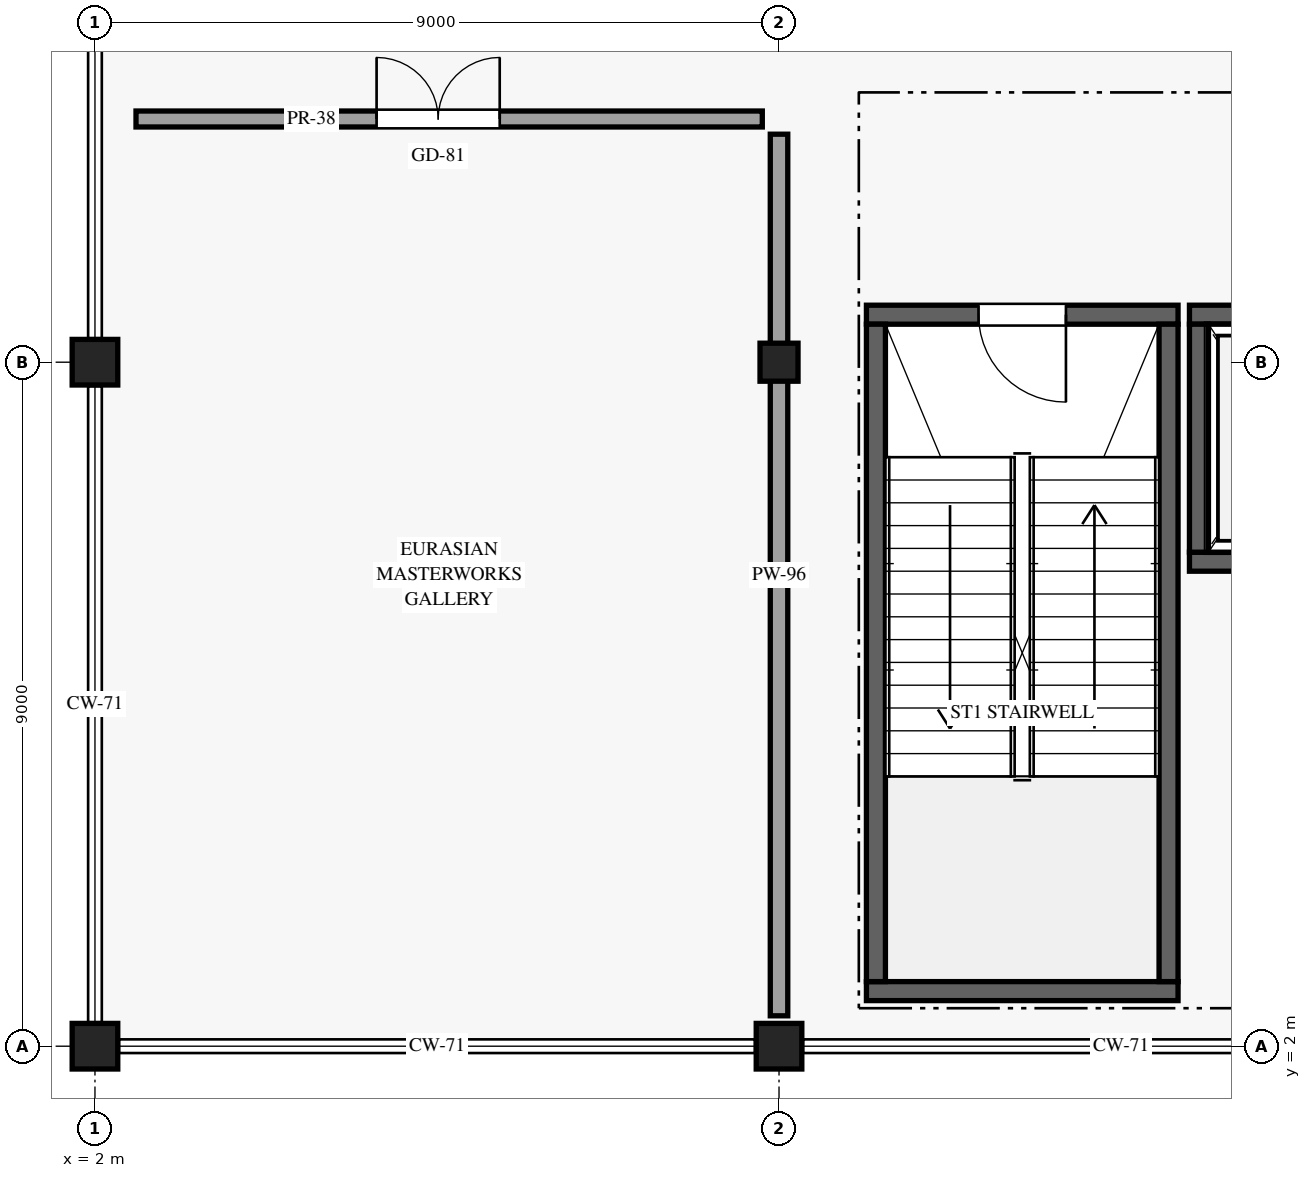
"""IFC4 building model, lengths in metres.
Left out: names, types, materials, properties, quantities, classifications, styles, units other than length and angle.
Written with IfcOpenShell. Run it as: python <this file> out.ifc"""

import sys

from ifc_helpers import new_model, si_unit, direction, frame, frame_2d, origin, origin_2d, place, context, subcontext, project, spatial, rectangle, extrude, element, fill, save


model = new_model("IFC4")
c1 = context("Model", 3, precision=1e-05, world=origin(), true_north=direction((0.0, 1.0)))
c2 = subcontext(c1, "Body", "Model", "MODEL_VIEW")
j1 = project(units=[si_unit("LENGTHUNIT", "METRE"), si_unit("PLANEANGLEUNIT", "RADIAN")], contexts=[c1])
p1 = place(None, origin())
s1 = spatial("IfcSite", under=j1, at=p1, CompositionType="ELEMENT")
p2 = place(p1, origin())
s2 = spatial("IfcBuilding", under=s1, at=p2, CompositionType="ELEMENT")
p3 = place(p2, frame((0.0, 0.0, 19.5)))
s3 = spatial("IfcBuildingStorey", under=s2, at=p3, CompositionType="ELEMENT", Elevation=19.5)
for number, where, z_axis, x_axis in (
    (1, (2.0, 2.0, 0.0), (0.0, 0.0, 1.0), (1.0, 0.0, 0.0)),
    (2, (2.0, 11.0, 0.0), (0.0, 0.0, 1.0), (1.0, 0.0, 0.0)),
    (3, (11.0, 2.0, 0.0), (0.0, 0.0, 1.0), (1.0, 0.0, 0.0)),
):
    element("IfcColumn", number, at=place(p3, frame(where, z_axis=z_axis, x_axis=x_axis)), inside=s3, PredefinedType="COLUMN", context=c2, shape_type="SweptSolid", body=[
        extrude(rectangle(XDim=0.6, YDim=0.6, at=origin_2d()), origin(), (0.0, 0.0, 1.0), 4.5),
    ])
p4 = place(p3, frame((11.0, 11.0, 0.0), z_axis=(0.0, 0.0, 1.0), x_axis=(1.0, 0.0, 0.0)))
e4 = element("IfcColumn", 4, at=p4, inside=s3, PredefinedType="COLUMN", context=c2, shape_type="SweptSolid", body=[
    extrude(rectangle(XDim=0.5, YDim=0.5, at=origin_2d()), origin(), (0.0, 0.0, 1.0), 4.5),
])
p5 = place(p3, frame((12.15, 11.625, 0.0), z_axis=(0.0, 0.0, 1.0), x_axis=(1.0, 0.0, 0.0)))
e5 = element("IfcWall", 5, at=p5, inside=s3, PredefinedType="SHEAR", context=c2, shape_type="SweptSolid", body=[
    extrude(rectangle(XDim=4.1, YDim=0.25, at=frame_2d((2.05, 0.0))), origin(), (0.0, 0.0, 1.0), 4.22),
])
p6 = place(p5, frame((2.625, 0.0, 0.0), z_axis=(0.0, 0.0, 1.0), x_axis=(-1.0, 0.0, 0.0)))
e6 = element("IfcOpeningElement", 6, at=p6, cuts=e5, PredefinedType="OPENING", context=c2, shape_type="SweptSolid", body=[
    extrude(rectangle(XDim=1.15, YDim=2.2, at=frame_2d((0.575, 1.1))), frame((0.0, 0.135, 0.0), z_axis=(0.0, -1.0, 0.0), x_axis=(1.0, 0.0, 0.0)), (0.0, 0.0, 1.0), 0.27),
])
p7 = place(p3, frame((12.15, 2.725, 0.0), z_axis=(0.0, 0.0, 1.0), x_axis=(1.0, 0.0, 0.0)))
e7 = element("IfcWall", 7, at=p7, inside=s3, PredefinedType="SHEAR", context=c2, shape_type="SweptSolid", body=[
    extrude(rectangle(XDim=4.1, YDim=0.25, at=frame_2d((2.05, 0.0))), origin(), (0.0, 0.0, 1.0), 4.22),
])
for number, where, z_axis, x_axis in (
    (8, (12.275, 2.85, 0.0), (0.0, 0.0, 1.0), (0.0, 1.0, 0.0)),
    (9, (16.125, 2.85, 0.0), (0.0, 0.0, 1.0), (0.0, 1.0, 0.0)),
):
    element("IfcWall", number, at=place(p3, frame(where, z_axis=z_axis, x_axis=x_axis)), inside=s3, PredefinedType="SHEAR", context=c2, shape_type="SweptSolid", body=[
        extrude(rectangle(XDim=8.65, YDim=0.25, at=frame_2d((4.325, 0.0))), origin(), (0.0, 0.0, 1.0), 4.22),
    ])
p8 = place(p3, frame((16.4, 11.625, 0.0), z_axis=(0.0, 0.0, 1.0), x_axis=(1.0, 0.0, 0.0)))
e10 = element("IfcWall", 10, at=p8, inside=s3, PredefinedType="SHEAR", context=c2, shape_type="SweptSolid", body=[
    extrude(rectangle(XDim=2.5, YDim=0.25, at=frame_2d((1.25, 0.0))), origin(), (0.0, 0.0, 1.0), 4.22),
])
p9 = place(p8, frame((0.7, 0.0, 0.0)))
e11 = element("IfcOpeningElement", 11, at=p9, cuts=e10, PredefinedType="OPENING", context=c2, shape_type="SweptSolid", body=[
    extrude(rectangle(XDim=1.1, YDim=2.2, at=frame_2d((0.55, 1.1))), frame((0.0, 0.135, 0.0), z_axis=(0.0, -1.0, 0.0), x_axis=(1.0, 0.0, 0.0)), (0.0, 0.0, 1.0), 0.27),
])
p10 = place(p3, frame((16.4, 8.375, 0.0), z_axis=(0.0, 0.0, 1.0), x_axis=(1.0, 0.0, 0.0)))
e12 = element("IfcWall", 12, at=p10, inside=s3, PredefinedType="SHEAR", context=c2, shape_type="SweptSolid", body=[
    extrude(rectangle(XDim=2.5, YDim=0.25, at=frame_2d((1.25, 0.0))), origin(), (0.0, 0.0, 1.0), 4.22),
])
p11 = place(p3, frame((16.525, 8.5, 0.0), z_axis=(0.0, 0.0, 1.0), x_axis=(0.0, 1.0, 0.0)))
e13 = element("IfcWall", 13, at=p11, inside=s3, PredefinedType="SHEAR", context=c2, shape_type="SweptSolid", body=[
    extrude(rectangle(XDim=3.0, YDim=0.25, at=frame_2d((1.5, 0.0))), origin(), (0.0, 0.0, 1.0), 4.22),
])
p12 = place(p3, frame((2.54, 14.2, 0.0), z_axis=(0.0, 0.0, 1.0), x_axis=(1.0, 0.0, 0.0)))
e14 = element("IfcWall", 14, at=p12, inside=s3, PredefinedType="PARTITIONING", context=c2, shape_type="SweptSolid", body=[
    extrude(rectangle(XDim=8.24, YDim=0.21, at=frame_2d((4.12, 0.0))), origin(), (0.0, 0.0, 1.0), 3.715),
])
p13 = place(p12, frame((3.165, 0.0, 0.0)))
e15 = element("IfcOpeningElement", 15, at=p13, cuts=e14, PredefinedType="OPENING", context=c2, shape_type="SweptSolid", body=[
    extrude(rectangle(XDim=1.62, YDim=2.4, at=frame_2d((0.81, 1.2))), frame((0.0, 0.115, 0.0), z_axis=(0.0, -1.0, 0.0), x_axis=(1.0, 0.0, 0.0)), (0.0, 0.0, 1.0), 0.23),
])
p14 = place(p3, frame((11.0, 2.4, 0.0), z_axis=(0.0, 0.0, 1.0), x_axis=(0.0, 1.0, 0.0)))
e16 = element("IfcWall", 16, at=p14, inside=s3, PredefinedType="PARTITIONING", context=c2, shape_type="SweptSolid", body=[
    extrude(rectangle(XDim=11.6, YDim=0.23, at=frame_2d((5.8, 0.0))), origin(), (0.0, 0.0, 1.0), 3.715),
])
p15 = place(p6, origin())
e17 = element("IfcDoor", 17, at=p15, inside=s3, OperationType="SINGLE_SWING_LEFT", PredefinedType="DOOR", context=c2, shape_type="SweptSolid", body=[
    extrude(rectangle(XDim=1.15, YDim=2.2, at=frame_2d((0.575, 1.1))), frame((0.0, 0.025, 0.0), z_axis=(0.0, -1.0, 0.0), x_axis=(1.0, 0.0, 0.0)), (0.0, 0.0, 1.0), 0.05),
])
fill(e6, e17)
p16 = place(p13, origin())
e18 = element("IfcDoor", 18, at=p16, inside=s3, OperationType="DOUBLE_DOOR_SINGLE_SWING", PredefinedType="DOOR", context=c2, shape_type="SweptSolid", body=[
    extrude(rectangle(XDim=1.62, YDim=2.4, at=frame_2d((0.81, 1.2))), frame((0.0, 0.025, 0.0), z_axis=(0.0, -1.0, 0.0), x_axis=(1.0, 0.0, 0.0)), (0.0, 0.0, 1.0), 0.05),
])
fill(e15, e18)
save(model, sys.argv[1])
